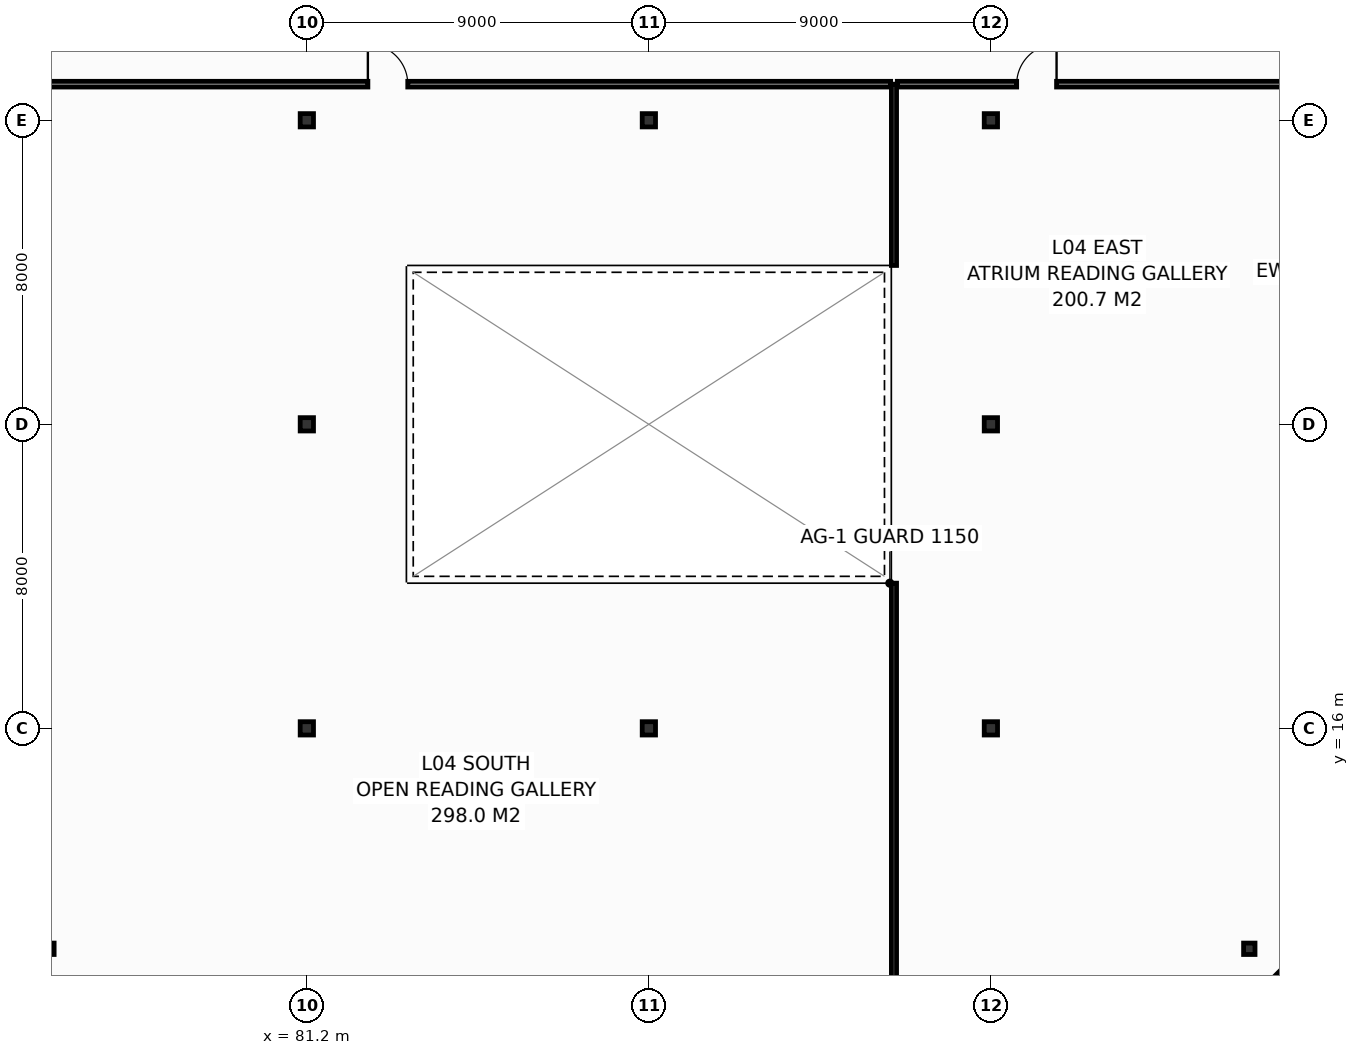
"""IFC4 building model, lengths in metres.
Left out: names, types, materials, properties, quantities, classifications, styles, units other than length and angle.
Written with IfcOpenShell. Run it as: python <this file> out.ifc"""

import sys

from ifc_helpers import new_model, si_unit, direction, frame, frame_2d, origin, origin_2d, place, context, subcontext, project, spatial, rectangle, i_section, extrude, element, fill, save


model = new_model("IFC4")
c1 = context("Model", 3, precision=1e-05, world=origin(), true_north=direction((0.0, 1.0)))
c2 = subcontext(c1, "Body", "Model", "MODEL_VIEW")
j1 = project(units=[si_unit("LENGTHUNIT", "METRE"), si_unit("PLANEANGLEUNIT", "RADIAN")], contexts=[c1])
p1 = place(None, origin())
s1 = spatial("IfcSite", under=j1, at=p1, CompositionType="ELEMENT")
p2 = place(p1, origin())
s2 = spatial("IfcBuilding", under=s1, at=p2, CompositionType="ELEMENT")
p3 = place(p2, frame((0.0, 0.0, 22.2)))
s3 = spatial("IfcBuildingStorey", under=s2, at=p3, CompositionType="ELEMENT", Elevation=22.2)
p4 = place(p3, frame((74.4, 10.2, 0.0), z_axis=(0.0, 0.0, 1.0), x_axis=(1.0, 0.0, 0.0)))
e1 = element("IfcColumn", 1, at=p4, inside=s3, PredefinedType="COLUMN", context=c2, shape_type="SweptSolid", body=[
    extrude(i_section(OverallWidth=0.3, OverallDepth=0.3, WebThickness=0.01, FlangeThickness=0.015, FilletRadius=0.018, at=origin_2d()), origin(), (0.0, 0.0, 1.0), 5.4),
])
for number, where, z_axis, x_axis in (
    (2, (81.2, 16.0, 0.0), (0.0, 0.0, 1.0), (1.0, 0.0, 0.0)),
    (3, (81.2, 24.0, 0.0), (0.0, 0.0, 1.0), (1.0, 0.0, 0.0)),
    (4, (81.2, 32.0, 0.0), (0.0, 0.0, 1.0), (1.0, 0.0, 0.0)),
    (5, (90.2, 16.0, 0.0), (0.0, 0.0, 1.0), (1.0, 0.0, 0.0)),
    (6, (90.2, 32.0, 0.0), (0.0, 0.0, 1.0), (1.0, 0.0, 0.0)),
    (7, (99.2, 16.0, 0.0), (0.0, 0.0, 1.0), (1.0, 0.0, 0.0)),
    (8, (99.2, 24.0, 0.0), (0.0, 0.0, 1.0), (1.0, 0.0, 0.0)),
    (9, (99.2, 32.0, 0.0), (0.0, 0.0, 1.0), (1.0, 0.0, 0.0)),
):
    element("IfcColumn", number, at=place(p3, frame(where, z_axis=z_axis, x_axis=x_axis)), inside=s3, PredefinedType="COLUMN", context=c2, shape_type="SweptSolid", body=[
        extrude(i_section(OverallWidth=0.35, OverallDepth=0.35, WebThickness=0.012, FlangeThickness=0.019, FilletRadius=0.02, at=origin_2d()), origin(), (0.0, 0.0, 1.0), 5.4),
    ])
p5 = place(p3, frame((106.0, 10.2, 0.0), z_axis=(0.0, 0.0, 1.0), x_axis=(1.0, 0.0, 0.0)))
e10 = element("IfcColumn", 10, at=p5, inside=s3, PredefinedType="COLUMN", context=c2, shape_type="SweptSolid", body=[
    extrude(i_section(OverallWidth=0.3, OverallDepth=0.3, WebThickness=0.01, FlangeThickness=0.015, FilletRadius=0.018, at=origin_2d()), origin(), (0.0, 0.0, 1.0), 5.4),
])
p6 = place(p3, frame((72.313, 10.687, 0.0), z_axis=(0.0, 0.0, 1.0), x_axis=(0.707106781187, -0.707106781187, 0.0)))
e11 = element("IfcWall", 11, at=p6, inside=s3, PredefinedType="STANDARD", context=c2, shape_type="SweptSolid", body=[
    extrude(rectangle(XDim=3.64, YDim=0.3, at=frame_2d((1.82, 0.0))), origin(), (0.0, 0.0, 1.0), 5.15),
])
p7 = place(p3, frame((105.513, 8.113, 0.0), z_axis=(0.0, 0.0, 1.0), x_axis=(0.707073244381, 0.707140316402, 0.0)))
e12 = element("IfcWall", 12, at=p7, inside=s3, PredefinedType="STANDARD", context=c2, shape_type="SweptSolid", body=[
    extrude(rectangle(XDim=3.64, YDim=0.3, at=frame_2d((1.82, 0.0))), origin(), (0.0, 0.0, 1.0), 5.15),
])
p8 = place(p3, frame((96.65, 8.1, 0.0), z_axis=(0.0, 0.0, 1.0), x_axis=(0.0, 1.0, 0.0)))
e13 = element("IfcWall", 13, at=p8, inside=s3, PredefinedType="PARTITIONING", context=c2, shape_type="SweptSolid", body=[
    extrude(rectangle(XDim=11.72, YDim=0.135, at=frame_2d((5.86, 0.0))), origin(), (0.0, 0.0, 1.0), 3.285),
])
p9 = place(p3, frame((96.65, 28.18, 0.0), z_axis=(0.0, 0.0, 1.0), x_axis=(0.0, 1.0, 0.0)))
e14 = element("IfcWall", 14, at=p9, inside=s3, PredefinedType="PARTITIONING", context=c2, shape_type="SweptSolid", body=[
    extrude(rectangle(XDim=4.77, YDim=0.135, at=frame_2d((2.385, 0.0))), origin(), (0.0, 0.0, 1.0), 3.285),
])
p10 = place(p3, frame((72.3, 32.95, 0.0), z_axis=(0.0, 0.0, 1.0), x_axis=(1.0, 0.0, 0.0)))
e15 = element("IfcWall", 15, at=p10, inside=s3, PredefinedType="PARTITIONING", context=c2, shape_type="SweptSolid", body=[
    extrude(rectangle(XDim=24.262, YDim=0.15, at=frame_2d((12.131, 0.0))), origin(), (0.0, 0.0, 1.0), 3.285),
])
p11 = place(p10, frame((10.506, 0.0, 0.0)))
e16 = element("IfcOpeningElement", 16, at=p11, cuts=e15, PredefinedType="OPENING", context=c2, shape_type="SweptSolid", body=[
    extrude(rectangle(XDim=1.05, YDim=2.15, at=frame_2d((0.525, 1.075))), frame((0.0, 0.085, 0.0), z_axis=(0.0, -1.0, 0.0), x_axis=(1.0, 0.0, 0.0)), (0.0, 0.0, 1.0), 0.17),
])
p12 = place(p3, frame((96.738, 32.95, 0.0), z_axis=(0.0, 0.0, 1.0), x_axis=(1.0, 0.0, 0.0)))
e17 = element("IfcWall", 17, at=p12, inside=s3, PredefinedType="PARTITIONING", context=c2, shape_type="SweptSolid", body=[
    extrude(rectangle(XDim=11.292, YDim=0.15, at=frame_2d((5.646, 0.0))), origin(), (0.0, 0.0, 1.0), 3.285),
])
p13 = place(p12, frame((3.141, 0.0, 0.0)))
e18 = element("IfcOpeningElement", 18, at=p13, cuts=e17, PredefinedType="OPENING", context=c2, shape_type="SweptSolid", body=[
    extrude(rectangle(XDim=1.05, YDim=2.15, at=frame_2d((0.525, 1.075))), frame((0.0, 0.085, 0.0), z_axis=(0.0, -1.0, 0.0), x_axis=(1.0, 0.0, 0.0)), (0.0, 0.0, 1.0), 0.17),
])
p14 = place(p11, origin())
e19 = element("IfcDoor", 19, at=p14, inside=s3, OperationType="SINGLE_SWING_LEFT", PredefinedType="DOOR", context=c2, shape_type="SweptSolid", body=[
    extrude(rectangle(XDim=1.05, YDim=2.15, at=frame_2d((0.525, 1.075))), frame((0.0, 0.025, 0.0), z_axis=(0.0, -1.0, 0.0), x_axis=(1.0, 0.0, 0.0)), (0.0, 0.0, 1.0), 0.05),
])
fill(e16, e19)
p15 = place(p13, origin())
e20 = element("IfcDoor", 20, at=p15, inside=s3, OperationType="SINGLE_SWING_RIGHT", PredefinedType="DOOR", context=c2, shape_type="SweptSolid", body=[
    extrude(rectangle(XDim=1.05, YDim=2.15, at=frame_2d((0.525, 1.075))), frame((0.0, 0.025, 0.0), z_axis=(0.0, -1.0, 0.0), x_axis=(1.0, 0.0, 0.0)), (0.0, 0.0, 1.0), 0.05),
])
fill(e18, e20)
save(model, sys.argv[1])
